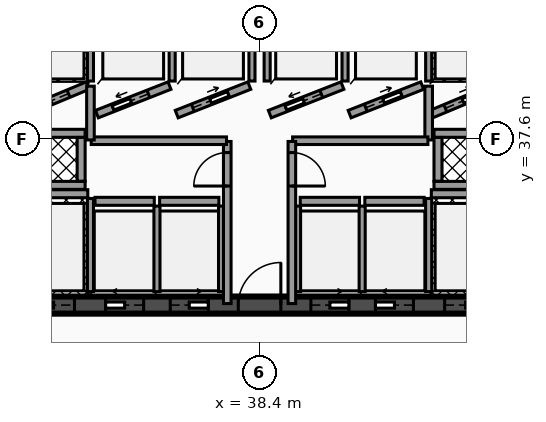
"""IFC4 building model, lengths in metres.
Left out: names, types, materials, properties, quantities, classifications, styles, units other than length and angle.
Written with IfcOpenShell. Run it as: python <this file> out.ifc"""

import sys

from ifc_helpers import new_model, si_unit, direction, frame, frame_2d, origin, place, context, subcontext, project, spatial, rectangle, extrude, element, fill, save


model = new_model("IFC4")
c1 = context("Model", 3, precision=1e-05, world=origin(), true_north=direction((0.0, 1.0)))
c2 = subcontext(c1, "Body", "Model", "MODEL_VIEW")
j1 = project(units=[si_unit("LENGTHUNIT", "METRE"), si_unit("PLANEANGLEUNIT", "RADIAN")], contexts=[c1])
p1 = place(None, origin())
s1 = spatial("IfcSite", under=j1, at=p1, CompositionType="ELEMENT")
p2 = place(p1, origin())
s2 = spatial("IfcBuilding", under=s1, at=p2, CompositionType="ELEMENT")
p3 = place(p2, origin())
s3 = spatial("IfcBuildingStorey", under=s2, at=p3, CompositionType="ELEMENT", Elevation=0.0)
p4 = place(p3, frame((28.4, 33.225, 0.0), z_axis=(0.0, 0.0, 1.0), x_axis=(1.0, 0.0, 0.0)))
e1 = element("IfcWall", 1, at=p4, inside=s3, PredefinedType="SHEAR", context=c2, shape_type="SweptSolid", body=[
    extrude(rectangle(XDim=20.11, YDim=0.45, at=frame_2d((10.055, 0.0))), origin(), (0.0, 0.0, 1.0), 4.82),
])
p5 = place(p4, frame((4.03, 0.0, 0.0)))
e2 = element("IfcOpeningElement", 2, at=p5, cuts=e1, PredefinedType="OPENING", context=c2, shape_type="SweptSolid", body=[
    extrude(rectangle(XDim=1.1, YDim=2.15, at=frame_2d((0.55, 1.075))), frame((0.0, 0.235, 0.0), z_axis=(0.0, -1.0, 0.0), x_axis=(1.0, 0.0, 0.0)), (0.0, 0.0, 1.0), 0.47),
])
p6 = place(p4, frame((14.87, 0.0, 0.0)))
e3 = element("IfcOpeningElement", 3, at=p6, cuts=e1, PredefinedType="OPENING", context=c2, shape_type="SweptSolid", body=[
    extrude(rectangle(XDim=1.1, YDim=2.15, at=frame_2d((0.55, 1.075))), frame((0.0, 0.235, 0.0), z_axis=(0.0, -1.0, 0.0), x_axis=(1.0, 0.0, 0.0)), (0.0, 0.0, 1.0), 0.47),
])
p7 = place(p4, frame((5.95, 0.0, 0.0)))
e4 = element("IfcOpeningElement", 4, at=p7, cuts=e1, PredefinedType="OPENING", context=c2, shape_type="SweptSolid", body=[
    extrude(rectangle(XDim=1.0, YDim=2.1, at=frame_2d((0.5, 1.05))), frame((0.0, 0.235, 0.0), z_axis=(0.0, -1.0, 0.0), x_axis=(1.0, 0.0, 0.0)), (0.0, 0.0, 1.0), 0.47),
])
p8 = place(p4, frame((7.65, 0.0, 0.0)))
e5 = element("IfcOpeningElement", 5, at=p8, cuts=e1, PredefinedType="OPENING", context=c2, shape_type="SweptSolid", body=[
    extrude(rectangle(XDim=1.0, YDim=2.1, at=frame_2d((0.5, 1.05))), frame((0.0, 0.235, 0.0), z_axis=(0.0, -1.0, 0.0), x_axis=(1.0, 0.0, 0.0)), (0.0, 0.0, 1.0), 0.47),
])
p9 = place(p4, frame((11.35, 0.0, 0.0)))
e6 = element("IfcOpeningElement", 6, at=p9, cuts=e1, PredefinedType="OPENING", context=c2, shape_type="SweptSolid", body=[
    extrude(rectangle(XDim=1.0, YDim=2.1, at=frame_2d((0.5, 1.05))), frame((0.0, 0.235, 0.0), z_axis=(0.0, -1.0, 0.0), x_axis=(1.0, 0.0, 0.0)), (0.0, 0.0, 1.0), 0.47),
])
p10 = place(p4, frame((13.05, 0.0, 0.0)))
e7 = element("IfcOpeningElement", 7, at=p10, cuts=e1, PredefinedType="OPENING", context=c2, shape_type="SweptSolid", body=[
    extrude(rectangle(XDim=1.0, YDim=2.1, at=frame_2d((0.5, 1.05))), frame((0.0, 0.235, 0.0), z_axis=(0.0, -1.0, 0.0), x_axis=(1.0, 0.0, 0.0)), (0.0, 0.0, 1.0), 0.47),
])
p11 = place(p4, frame((1.31, 0.0, 0.0)))
e8 = element("IfcOpeningElement", 8, at=p11, cuts=e1, PredefinedType="OPENING", context=c2, shape_type="SweptSolid", body=[
    extrude(rectangle(XDim=1.1, YDim=2.2, at=frame_2d((0.55, 1.1))), frame((0.0, 0.235, 0.0), z_axis=(0.0, -1.0, 0.0), x_axis=(1.0, 0.0, 0.0)), (0.0, 0.0, 1.0), 0.47),
])
p12 = place(p4, frame((9.44, 0.0, 0.0)))
e9 = element("IfcOpeningElement", 9, at=p12, cuts=e1, PredefinedType="OPENING", context=c2, shape_type="SweptSolid", body=[
    extrude(rectangle(XDim=1.12, YDim=2.05, at=frame_2d((0.56, 1.025))), frame((0.0, 0.235, 0.0), z_axis=(0.0, -1.0, 0.0), x_axis=(1.0, 0.0, 0.0)), (0.0, 0.0, 1.0), 0.47),
])
p13 = place(p4, frame((17.65, 0.0, 0.0)))
e10 = element("IfcOpeningElement", 10, at=p13, cuts=e1, PredefinedType="OPENING", context=c2, shape_type="SweptSolid", body=[
    extrude(rectangle(XDim=1.1, YDim=2.2, at=frame_2d((0.55, 1.1))), frame((0.0, 0.235, 0.0), z_axis=(0.0, -1.0, 0.0), x_axis=(1.0, 0.0, 0.0)), (0.0, 0.0, 1.0), 0.47),
])
p14 = place(p3, frame((32.08, 36.155, 0.0), z_axis=(0.0, 0.0, 1.0), x_axis=(1.0, 0.0, 0.0)))
e11 = element("IfcWall", 11, at=p14, inside=s3, PredefinedType="SOLIDWALL", context=c2, shape_type="SweptSolid", body=[
    extrude(rectangle(XDim=1.8, YDim=0.21, at=frame_2d((0.9, 0.0))), origin(), (0.0, 0.0, 1.0), 3.792),
])
p15 = place(p3, frame((33.95, 33.58, 0.0), z_axis=(0.0, 0.0, 1.0), x_axis=(0.0, 1.0, 0.0)))
e12 = element("IfcWall", 12, at=p15, inside=s3, PredefinedType="SOLIDWALL", context=c2, shape_type="SweptSolid", body=[
    extrude(rectangle(XDim=2.45, YDim=0.16, at=frame_2d((1.225, 0.0))), origin(), (0.0, 0.0, 1.0), 3.792),
])
p16 = place(p3, frame((42.92, 36.155, 0.0), z_axis=(0.0, 0.0, 1.0), x_axis=(1.0, 0.0, 0.0)))
e13 = element("IfcWall", 13, at=p16, inside=s3, PredefinedType="SOLIDWALL", context=c2, shape_type="SweptSolid", body=[
    extrude(rectangle(XDim=1.8, YDim=0.21, at=frame_2d((0.9, 0.0))), origin(), (0.0, 0.0, 1.0), 3.792),
])
p17 = place(p3, frame((42.85, 33.58, 0.0), z_axis=(0.0, 0.0, 1.0), x_axis=(0.0, 1.0, 0.0)))
e14 = element("IfcWall", 14, at=p17, inside=s3, PredefinedType="SOLIDWALL", context=c2, shape_type="SweptSolid", body=[
    extrude(rectangle(XDim=2.45, YDim=0.16, at=frame_2d((1.225, 0.0))), origin(), (0.0, 0.0, 1.0), 3.792),
])
p18 = place(p3, frame((32.08, 38.25, 0.0), z_axis=(0.0, 0.0, 1.0), x_axis=(0.923062104416, 0.384650947472, 0.0)))
e15 = element("IfcWall", 15, at=p18, inside=s3, PredefinedType="SOLIDWALL", context=c2, shape_type="SweptSolid", body=[
    extrude(rectangle(XDim=1.95, YDim=0.21, at=frame_2d((0.975, 0.0))), origin(), (0.0, 0.0, 1.0), 3.792),
])
p19 = place(p18, frame((0.4, 0.0, 0.0)))
e16 = element("IfcOpeningElement", 16, at=p19, cuts=e15, PredefinedType="OPENING", context=c2, shape_type="SweptSolid", body=[
    extrude(rectangle(XDim=1.0, YDim=2.1, at=frame_2d((0.5, 1.05))), frame((0.0, 0.115, 0.0), z_axis=(0.0, -1.0, 0.0), x_axis=(1.0, 0.0, 0.0)), (0.0, 0.0, 1.0), 0.23),
])
p20 = place(p3, frame((33.95, 39.12, 0.0), z_axis=(0.0, 0.0, 1.0), x_axis=(0.0, 1.0, 0.0)))
e17 = element("IfcWall", 17, at=p20, inside=s3, PredefinedType="SOLIDWALL", context=c2, shape_type="SweptSolid", body=[
    extrude(rectangle(XDim=2.21, YDim=0.16, at=frame_2d((1.105, 0.0))), origin(), (0.0, 0.0, 1.0), 3.792),
])
p21 = place(p3, frame((42.92, 38.25, 0.0), z_axis=(0.0, 0.0, 1.0), x_axis=(0.9230806271, 0.384606494839, 0.0)))
e18 = element("IfcWall", 18, at=p21, inside=s3, PredefinedType="SOLIDWALL", context=c2, shape_type="SweptSolid", body=[
    extrude(rectangle(XDim=1.95, YDim=0.21, at=frame_2d((0.975, 0.0))), origin(), (0.0, 0.0, 1.0), 3.792),
])
p22 = place(p21, frame((0.4, 0.0, 0.0)))
e19 = element("IfcOpeningElement", 19, at=p22, cuts=e18, PredefinedType="OPENING", context=c2, shape_type="SweptSolid", body=[
    extrude(rectangle(XDim=1.0, YDim=2.1, at=frame_2d((0.5, 1.05))), frame((0.0, 0.115, 0.0), z_axis=(0.0, -1.0, 0.0), x_axis=(1.0, 0.0, 0.0)), (0.0, 0.0, 1.0), 0.23),
])
p23 = place(p3, frame((42.85, 39.12, 0.0), z_axis=(0.0, 0.0, 1.0), x_axis=(0.0, 1.0, 0.0)))
e20 = element("IfcWall", 20, at=p23, inside=s3, PredefinedType="SOLIDWALL", context=c2, shape_type="SweptSolid", body=[
    extrude(rectangle(XDim=2.21, YDim=0.16, at=frame_2d((1.105, 0.0))), origin(), (0.0, 0.0, 1.0), 3.792),
])
p24 = place(p3, frame((34.12, 38.25, 0.0), z_axis=(0.0, 0.0, 1.0), x_axis=(0.930804993012, 0.36551616241, 0.0)))
e21 = element("IfcWall", 21, at=p24, inside=s3, PredefinedType="SOLIDWALL", context=c2, shape_type="SweptSolid", body=[
    extrude(rectangle(XDim=2.052, YDim=0.21, at=frame_2d((1.026, 0.0))), origin(), (0.0, 0.0, 1.0), 3.792),
])
p25 = place(p24, frame((0.455, 0.0, 0.0)))
e22 = element("IfcOpeningElement", 22, at=p25, cuts=e21, PredefinedType="OPENING", context=c2, shape_type="SweptSolid", body=[
    extrude(rectangle(XDim=1.0, YDim=2.1, at=frame_2d((0.5, 1.05))), frame((0.0, 0.115, 0.0), z_axis=(0.0, -1.0, 0.0), x_axis=(1.0, 0.0, 0.0)), (0.0, 0.0, 1.0), 0.23),
])
p26 = place(p3, frame((36.1, 39.12, 0.0), z_axis=(0.0, 0.0, 1.0), x_axis=(0.0, 1.0, 0.0)))
e23 = element("IfcWall", 23, at=p26, inside=s3, PredefinedType="SOLIDWALL", context=c2, shape_type="SweptSolid", body=[
    extrude(rectangle(XDim=2.21, YDim=0.16, at=frame_2d((1.105, 0.0))), origin(), (0.0, 0.0, 1.0), 3.792),
])
p27 = place(p3, frame((36.22, 38.25, 0.0), z_axis=(0.0, 0.0, 1.0), x_axis=(0.930804993012, 0.36551616241, 0.0)))
e24 = element("IfcWall", 24, at=p27, inside=s3, PredefinedType="SOLIDWALL", context=c2, shape_type="SweptSolid", body=[
    extrude(rectangle(XDim=2.052, YDim=0.21, at=frame_2d((1.026, 0.0))), origin(), (0.0, 0.0, 1.0), 3.792),
])
p28 = place(p27, frame((0.455, 0.0, 0.0)))
e25 = element("IfcOpeningElement", 25, at=p28, cuts=e24, PredefinedType="OPENING", context=c2, shape_type="SweptSolid", body=[
    extrude(rectangle(XDim=1.0, YDim=2.1, at=frame_2d((0.5, 1.05))), frame((0.0, 0.115, 0.0), z_axis=(0.0, -1.0, 0.0), x_axis=(1.0, 0.0, 0.0)), (0.0, 0.0, 1.0), 0.23),
])
p29 = place(p3, frame((38.2, 39.12, 0.0), z_axis=(0.0, 0.0, 1.0), x_axis=(0.0, 1.0, 0.0)))
e26 = element("IfcWall", 26, at=p29, inside=s3, PredefinedType="SOLIDWALL", context=c2, shape_type="SweptSolid", body=[
    extrude(rectangle(XDim=2.21, YDim=0.16, at=frame_2d((1.105, 0.0))), origin(), (0.0, 0.0, 1.0), 3.792),
])
p30 = place(p3, frame((38.67, 38.25, 0.0), z_axis=(0.0, 0.0, 1.0), x_axis=(0.930820886763, 0.3654756856, 0.0)))
e27 = element("IfcWall", 27, at=p30, inside=s3, PredefinedType="SOLIDWALL", context=c2, shape_type="SweptSolid", body=[
    extrude(rectangle(XDim=2.052, YDim=0.21, at=frame_2d((1.026, 0.0))), origin(), (0.0, 0.0, 1.0), 3.792),
])
p31 = place(p30, frame((0.455, 0.0, 0.0)))
e28 = element("IfcOpeningElement", 28, at=p31, cuts=e27, PredefinedType="OPENING", context=c2, shape_type="SweptSolid", body=[
    extrude(rectangle(XDim=1.0, YDim=2.1, at=frame_2d((0.5, 1.05))), frame((0.0, 0.115, 0.0), z_axis=(0.0, -1.0, 0.0), x_axis=(1.0, 0.0, 0.0)), (0.0, 0.0, 1.0), 0.23),
])
for number, where, z_axis, x_axis in (
    (29, (38.6, 39.12, 0.0), (0.0, 0.0, 1.0), (0.0, 1.0, 0.0)),
    (30, (40.65, 39.12, 0.0), (0.0, 0.0, 1.0), (0.0, 1.0, 0.0)),
):
    element("IfcWall", number, at=place(p3, frame(where, z_axis=z_axis, x_axis=x_axis)), inside=s3, PredefinedType="SOLIDWALL", context=c2, shape_type="SweptSolid", body=[
        extrude(rectangle(XDim=2.21, YDim=0.16, at=frame_2d((1.105, 0.0))), origin(), (0.0, 0.0, 1.0), 3.792),
    ])
p32 = place(p3, frame((40.77, 38.25, 0.0), z_axis=(0.0, 0.0, 1.0), x_axis=(0.930804993012, 0.36551616241, 0.0)))
e31 = element("IfcWall", 31, at=p32, inside=s3, PredefinedType="SOLIDWALL", context=c2, shape_type="SweptSolid", body=[
    extrude(rectangle(XDim=2.052, YDim=0.21, at=frame_2d((1.026, 0.0))), origin(), (0.0, 0.0, 1.0), 3.792),
])
p33 = place(p32, frame((0.455, 0.0, 0.0)))
e32 = element("IfcOpeningElement", 32, at=p33, cuts=e31, PredefinedType="OPENING", context=c2, shape_type="SweptSolid", body=[
    extrude(rectangle(XDim=1.0, YDim=2.1, at=frame_2d((0.5, 1.05))), frame((0.0, 0.115, 0.0), z_axis=(0.0, -1.0, 0.0), x_axis=(1.0, 0.0, 0.0)), (0.0, 0.0, 1.0), 0.23),
])
p34 = place(p3, frame((34.07, 35.955, 0.0), z_axis=(0.0, 0.0, 1.0), x_axis=(1.0, 0.0, 0.0)))
e33 = element("IfcWall", 33, at=p34, inside=s3, PredefinedType="SOLIDWALL", context=c2, shape_type="SweptSolid", body=[
    extrude(rectangle(XDim=1.56, YDim=0.21, at=frame_2d((0.78, 0.0))), origin(), (0.0, 0.0, 1.0), 3.792),
])
p35 = place(p3, frame((35.7, 33.58, 0.0), z_axis=(0.0, 0.0, 1.0), x_axis=(0.0, 1.0, 0.0)))
e34 = element("IfcWall", 34, at=p35, inside=s3, PredefinedType="SOLIDWALL", context=c2, shape_type="SweptSolid", body=[
    extrude(rectangle(XDim=2.25, YDim=0.16, at=frame_2d((1.125, 0.0))), origin(), (0.0, 0.0, 1.0), 3.792),
])
p36 = place(p3, frame((35.77, 35.955, 0.0), z_axis=(0.0, 0.0, 1.0), x_axis=(1.0, 0.0, 0.0)))
e35 = element("IfcWall", 35, at=p36, inside=s3, PredefinedType="SOLIDWALL", context=c2, shape_type="SweptSolid", body=[
    extrude(rectangle(XDim=1.56, YDim=0.21, at=frame_2d((0.78, 0.0))), origin(), (0.0, 0.0, 1.0), 3.792),
])
p37 = place(p3, frame((37.4, 33.58, 0.0), z_axis=(0.0, 0.0, 1.0), x_axis=(0.0, 1.0, 0.0)))
e36 = element("IfcWall", 36, at=p37, inside=s3, PredefinedType="SOLIDWALL", context=c2, shape_type="SweptSolid", body=[
    extrude(rectangle(XDim=2.25, YDim=0.16, at=frame_2d((1.125, 0.0))), origin(), (0.0, 0.0, 1.0), 3.792),
])
p38 = place(p3, frame((39.47, 35.955, 0.0), z_axis=(0.0, 0.0, 1.0), x_axis=(1.0, 0.0, 0.0)))
e37 = element("IfcWall", 37, at=p38, inside=s3, PredefinedType="SOLIDWALL", context=c2, shape_type="SweptSolid", body=[
    extrude(rectangle(XDim=1.56, YDim=0.21, at=frame_2d((0.78, 0.0))), origin(), (0.0, 0.0, 1.0), 3.792),
])
for number, where, z_axis, x_axis in (
    (38, (39.4, 33.58, 0.0), (0.0, 0.0, 1.0), (0.0, 1.0, 0.0)),
    (39, (41.1, 33.58, 0.0), (0.0, 0.0, 1.0), (0.0, 1.0, 0.0)),
):
    element("IfcWall", number, at=place(p3, frame(where, z_axis=z_axis, x_axis=x_axis)), inside=s3, PredefinedType="SOLIDWALL", context=c2, shape_type="SweptSolid", body=[
        extrude(rectangle(XDim=2.25, YDim=0.16, at=frame_2d((1.125, 0.0))), origin(), (0.0, 0.0, 1.0), 3.792),
    ])
p39 = place(p3, frame((41.17, 35.955, 0.0), z_axis=(0.0, 0.0, 1.0), x_axis=(1.0, 0.0, 0.0)))
e40 = element("IfcWall", 40, at=p39, inside=s3, PredefinedType="SOLIDWALL", context=c2, shape_type="SweptSolid", body=[
    extrude(rectangle(XDim=1.56, YDim=0.21, at=frame_2d((0.78, 0.0))), origin(), (0.0, 0.0, 1.0), 3.792),
])
for number, where, z_axis, x_axis in (
    (41, (32.21, 36.375, 0.0), (0.0, 0.0, 1.0), (1.0, 0.0, 0.0)),
    (42, (32.21, 37.745, 0.0), (0.0, 0.0, 1.0), (1.0, 0.0, 0.0)),
):
    element("IfcWall", number, at=place(p3, frame(where, z_axis=z_axis, x_axis=x_axis)), inside=s3, PredefinedType="SOLIDWALL", context=c2, shape_type="SweptSolid", body=[
        extrude(rectangle(XDim=1.6, YDim=0.21, at=frame_2d((0.8, 0.0))), origin(), (0.0, 0.0, 1.0), 4.82),
    ])
p40 = place(p3, frame((33.705, 36.485, 0.0), z_axis=(0.0, 0.0, 1.0), x_axis=(0.0, 1.0, 0.0)))
e43 = element("IfcWall", 43, at=p40, inside=s3, PredefinedType="SOLIDWALL", context=c2, shape_type="SweptSolid", body=[
    extrude(rectangle(XDim=1.15, YDim=0.21, at=frame_2d((0.575, 0.0))), origin(), (0.0, 0.0, 1.0), 4.82),
])
for number, where, z_axis, x_axis in (
    (44, (42.99, 36.375, 0.0), (0.0, 0.0, 1.0), (1.0, 0.0, 0.0)),
    (45, (42.99, 37.745, 0.0), (0.0, 0.0, 1.0), (1.0, 0.0, 0.0)),
):
    element("IfcWall", number, at=place(p3, frame(where, z_axis=z_axis, x_axis=x_axis)), inside=s3, PredefinedType="SOLIDWALL", context=c2, shape_type="SweptSolid", body=[
        extrude(rectangle(XDim=1.6, YDim=0.21, at=frame_2d((0.8, 0.0))), origin(), (0.0, 0.0, 1.0), 4.82),
    ])
p41 = place(p3, frame((43.095, 36.485, 0.0), z_axis=(0.0, 0.0, 1.0), x_axis=(0.0, 1.0, 0.0)))
e46 = element("IfcWall", 46, at=p41, inside=s3, PredefinedType="SOLIDWALL", context=c2, shape_type="SweptSolid", body=[
    extrude(rectangle(XDim=1.15, YDim=0.21, at=frame_2d((0.575, 0.0))), origin(), (0.0, 0.0, 1.0), 4.82),
])
p42 = place(p3, frame((37.55, 33.265, 0.0), z_axis=(0.0, 0.0, 1.0), x_axis=(0.0, 1.0, 0.0)))
e47 = element("IfcWall", 47, at=p42, inside=s3, PredefinedType="PARTITIONING", context=c2, shape_type="SweptSolid", body=[
    extrude(rectangle(XDim=4.265, YDim=0.2, at=frame_2d((2.133, 0.0))), origin(), (0.0, 0.0, 1.0), 3.777),
])
p43 = place(p42, frame((3.093, 0.0, 0.0)))
e48 = element("IfcOpeningElement", 48, at=p43, cuts=e47, PredefinedType="OPENING", context=c2, shape_type="SweptSolid", body=[
    extrude(rectangle(XDim=0.88, YDim=2.05, at=frame_2d((0.44, 1.025))), frame((0.0, 0.11, 0.0), z_axis=(0.0, -1.0, 0.0), x_axis=(1.0, 0.0, 0.0)), (0.0, 0.0, 1.0), 0.22),
])
p44 = place(p3, frame((33.97, 37.55, 0.0), z_axis=(0.0, 0.0, 1.0), x_axis=(1.0, 0.0, 0.0)))
e49 = element("IfcWall", 49, at=p44, inside=s3, PredefinedType="PARTITIONING", context=c2, shape_type="SweptSolid", body=[
    extrude(rectangle(XDim=3.56, YDim=0.2, at=frame_2d((1.78, 0.0))), origin(), (0.0, 0.0, 1.0), 3.777),
])
for number, where, z_axis, x_axis in (
    (50, (33.95, 37.57, 0.0), (0.0, 0.0, 1.0), (0.0, 1.0, 0.0)),
    (51, (42.85, 37.57, 0.0), (0.0, 0.0, 1.0), (0.0, 1.0, 0.0)),
):
    element("IfcWall", number, at=place(p3, frame(where, z_axis=z_axis, x_axis=x_axis)), inside=s3, PredefinedType="PARTITIONING", context=c2, shape_type="SweptSolid", body=[
        extrude(rectangle(XDim=1.415, YDim=0.2, at=frame_2d((0.708, 0.0))), origin(), (0.0, 0.0, 1.0), 3.777),
    ])
p45 = place(p3, frame((39.27, 37.55, 0.0), z_axis=(0.0, 0.0, 1.0), x_axis=(1.0, 0.0, 0.0)))
e52 = element("IfcWall", 52, at=p45, inside=s3, PredefinedType="PARTITIONING", context=c2, shape_type="SweptSolid", body=[
    extrude(rectangle(XDim=3.56, YDim=0.2, at=frame_2d((1.78, 0.0))), origin(), (0.0, 0.0, 1.0), 3.777),
])
p46 = place(p3, frame((39.25, 37.53, 0.0), z_axis=(0.0, 0.0, 1.0), x_axis=(0.0, -1.0, 0.0)))
e53 = element("IfcWall", 53, at=p46, inside=s3, PredefinedType="PARTITIONING", context=c2, shape_type="SweptSolid", body=[
    extrude(rectangle(XDim=4.265, YDim=0.2, at=frame_2d((2.133, 0.0))), origin(), (0.0, 0.0, 1.0), 3.777),
])
p47 = place(p46, frame((0.292, 0.0, 0.0)))
e54 = element("IfcOpeningElement", 54, at=p47, cuts=e53, PredefinedType="OPENING", context=c2, shape_type="SweptSolid", body=[
    extrude(rectangle(XDim=0.88, YDim=2.05, at=frame_2d((0.44, 1.025))), frame((0.0, 0.11, 0.0), z_axis=(0.0, -1.0, 0.0), x_axis=(1.0, 0.0, 0.0)), (0.0, 0.0, 1.0), 0.22),
])
p48 = place(p5, origin())
e55 = element("IfcDoor", 55, at=p48, inside=s3, OperationType="SLIDING_TO_LEFT", PredefinedType="DOOR", context=c2, shape_type="SweptSolid", body=[
    extrude(rectangle(XDim=1.1, YDim=2.15, at=frame_2d((0.55, 1.075))), frame((0.0, 0.025, 0.0), z_axis=(0.0, -1.0, 0.0), x_axis=(1.0, 0.0, 0.0)), (0.0, 0.0, 1.0), 0.05),
])
fill(e2, e55)
p49 = place(p6, origin())
e56 = element("IfcDoor", 56, at=p49, inside=s3, OperationType="SLIDING_TO_RIGHT", PredefinedType="DOOR", context=c2, shape_type="SweptSolid", body=[
    extrude(rectangle(XDim=1.1, YDim=2.15, at=frame_2d((0.55, 1.075))), frame((0.0, 0.025, 0.0), z_axis=(0.0, -1.0, 0.0), x_axis=(1.0, 0.0, 0.0)), (0.0, 0.0, 1.0), 0.05),
])
fill(e3, e56)
p50 = place(p19, origin())
e57 = element("IfcDoor", 57, at=p50, inside=s3, OperationType="SLIDING_TO_LEFT", PredefinedType="DOOR", context=c2, shape_type="SweptSolid", body=[
    extrude(rectangle(XDim=1.0, YDim=2.1, at=frame_2d((0.5, 1.05))), frame((0.0, 0.025, 0.0), z_axis=(0.0, -1.0, 0.0), x_axis=(1.0, 0.0, 0.0)), (0.0, 0.0, 1.0), 0.05),
])
fill(e16, e57)
p51 = place(p22, origin())
e58 = element("IfcDoor", 58, at=p51, inside=s3, OperationType="SLIDING_TO_RIGHT", PredefinedType="DOOR", context=c2, shape_type="SweptSolid", body=[
    extrude(rectangle(XDim=1.0, YDim=2.1, at=frame_2d((0.5, 1.05))), frame((0.0, 0.025, 0.0), z_axis=(0.0, -1.0, 0.0), x_axis=(1.0, 0.0, 0.0)), (0.0, 0.0, 1.0), 0.05),
])
fill(e19, e58)
p52 = place(p25, origin())
e59 = element("IfcDoor", 59, at=p52, inside=s3, OperationType="SLIDING_TO_LEFT", PredefinedType="DOOR", context=c2, shape_type="SweptSolid", body=[
    extrude(rectangle(XDim=1.0, YDim=2.1, at=frame_2d((0.5, 1.05))), frame((0.0, 0.025, 0.0), z_axis=(0.0, -1.0, 0.0), x_axis=(1.0, 0.0, 0.0)), (0.0, 0.0, 1.0), 0.05),
])
fill(e22, e59)
p53 = place(p28, origin())
e60 = element("IfcDoor", 60, at=p53, inside=s3, OperationType="SLIDING_TO_RIGHT", PredefinedType="DOOR", context=c2, shape_type="SweptSolid", body=[
    extrude(rectangle(XDim=1.0, YDim=2.1, at=frame_2d((0.5, 1.05))), frame((0.0, 0.025, 0.0), z_axis=(0.0, -1.0, 0.0), x_axis=(1.0, 0.0, 0.0)), (0.0, 0.0, 1.0), 0.05),
])
fill(e25, e60)
p54 = place(p31, origin())
e61 = element("IfcDoor", 61, at=p54, inside=s3, OperationType="SLIDING_TO_LEFT", PredefinedType="DOOR", context=c2, shape_type="SweptSolid", body=[
    extrude(rectangle(XDim=1.0, YDim=2.1, at=frame_2d((0.5, 1.05))), frame((0.0, 0.025, 0.0), z_axis=(0.0, -1.0, 0.0), x_axis=(1.0, 0.0, 0.0)), (0.0, 0.0, 1.0), 0.05),
])
fill(e28, e61)
p55 = place(p33, origin())
e62 = element("IfcDoor", 62, at=p55, inside=s3, OperationType="SLIDING_TO_RIGHT", PredefinedType="DOOR", context=c2, shape_type="SweptSolid", body=[
    extrude(rectangle(XDim=1.0, YDim=2.1, at=frame_2d((0.5, 1.05))), frame((0.0, 0.025, 0.0), z_axis=(0.0, -1.0, 0.0), x_axis=(1.0, 0.0, 0.0)), (0.0, 0.0, 1.0), 0.05),
])
fill(e32, e62)
p56 = place(p7, origin())
e63 = element("IfcDoor", 63, at=p56, inside=s3, OperationType="SLIDING_TO_LEFT", PredefinedType="DOOR", context=c2, shape_type="SweptSolid", body=[
    extrude(rectangle(XDim=1.0, YDim=2.1, at=frame_2d((0.5, 1.05))), frame((0.0, 0.025, 0.0), z_axis=(0.0, -1.0, 0.0), x_axis=(1.0, 0.0, 0.0)), (0.0, 0.0, 1.0), 0.05),
])
fill(e4, e63)
p57 = place(p8, origin())
e64 = element("IfcDoor", 64, at=p57, inside=s3, OperationType="SLIDING_TO_RIGHT", PredefinedType="DOOR", context=c2, shape_type="SweptSolid", body=[
    extrude(rectangle(XDim=1.0, YDim=2.1, at=frame_2d((0.5, 1.05))), frame((0.0, 0.025, 0.0), z_axis=(0.0, -1.0, 0.0), x_axis=(1.0, 0.0, 0.0)), (0.0, 0.0, 1.0), 0.05),
])
fill(e5, e64)
p58 = place(p9, origin())
e65 = element("IfcDoor", 65, at=p58, inside=s3, OperationType="SLIDING_TO_RIGHT", PredefinedType="DOOR", context=c2, shape_type="SweptSolid", body=[
    extrude(rectangle(XDim=1.0, YDim=2.1, at=frame_2d((0.5, 1.05))), frame((0.0, 0.025, 0.0), z_axis=(0.0, -1.0, 0.0), x_axis=(1.0, 0.0, 0.0)), (0.0, 0.0, 1.0), 0.05),
])
fill(e6, e65)
p59 = place(p10, origin())
e66 = element("IfcDoor", 66, at=p59, inside=s3, OperationType="SLIDING_TO_LEFT", PredefinedType="DOOR", context=c2, shape_type="SweptSolid", body=[
    extrude(rectangle(XDim=1.0, YDim=2.1, at=frame_2d((0.5, 1.05))), frame((0.0, 0.025, 0.0), z_axis=(0.0, -1.0, 0.0), x_axis=(1.0, 0.0, 0.0)), (0.0, 0.0, 1.0), 0.05),
])
fill(e7, e66)
p60 = place(p12, origin())
e67 = element("IfcDoor", 67, at=p60, inside=s3, OperationType="SINGLE_SWING_RIGHT", PredefinedType="DOOR", context=c2, shape_type="SweptSolid", body=[
    extrude(rectangle(XDim=1.12, YDim=2.05, at=frame_2d((0.56, 1.025))), frame((0.0, 0.025, 0.0), z_axis=(0.0, -1.0, 0.0), x_axis=(1.0, 0.0, 0.0)), (0.0, 0.0, 1.0), 0.05),
])
fill(e9, e67)
p61 = place(p43, origin())
e68 = element("IfcDoor", 68, at=p61, inside=s3, OperationType="SINGLE_SWING_LEFT", PredefinedType="DOOR", context=c2, shape_type="SweptSolid", body=[
    extrude(rectangle(XDim=0.88, YDim=2.05, at=frame_2d((0.44, 1.025))), frame((0.0, 0.025, 0.0), z_axis=(0.0, -1.0, 0.0), x_axis=(1.0, 0.0, 0.0)), (0.0, 0.0, 1.0), 0.05),
])
fill(e48, e68)
p62 = place(p47, origin())
e69 = element("IfcDoor", 69, at=p62, inside=s3, OperationType="SINGLE_SWING_RIGHT", PredefinedType="DOOR", context=c2, shape_type="SweptSolid", body=[
    extrude(rectangle(XDim=0.88, YDim=2.05, at=frame_2d((0.44, 1.025))), frame((0.0, 0.025, 0.0), z_axis=(0.0, -1.0, 0.0), x_axis=(1.0, 0.0, 0.0)), (0.0, 0.0, 1.0), 0.05),
])
fill(e54, e69)
save(model, sys.argv[1])
